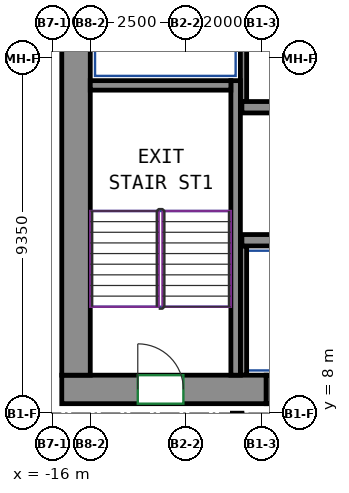
"""IFC4 building model, lengths in metres.
Left out: names, types, materials, properties, quantities, classifications, styles, units other than length and angle.
Written with IfcOpenShell. Run it as: python <this file> out.ifc"""

import sys

from ifc_helpers import new_model, si_unit, direction, frame, frame_2d, origin, place, context, subcontext, project, spatial, rectangle, extrude, source, transform, mapped, element, fill, save


model = new_model("IFC4")
c1 = context("Model", 3, precision=1e-05, world=origin(), true_north=direction((0.0, 1.0)))
c2 = subcontext(c1, "Body", "Model", "MODEL_VIEW")
j1 = project(units=[si_unit("LENGTHUNIT", "METRE"), si_unit("PLANEANGLEUNIT", "RADIAN")], contexts=[c1])
p1 = place(None, origin())
s1 = spatial("IfcSite", under=j1, at=p1, CompositionType="ELEMENT")
p2 = place(p1, origin())
s2 = spatial("IfcBuilding", under=s1, at=p2, CompositionType="ELEMENT")
p3 = place(p2, frame((0.0, 0.0, 182.1)))
s3 = spatial("IfcBuildingStorey", under=s2, at=p3, CompositionType="ELEMENT", Elevation=182.1)
m1 = source(origin(), c2, "Body", "SweptSolid", [
    extrude(rectangle(XDim=5.38, YDim=0.75, at=frame_2d((2.69, 0.0))), origin(), (0.0, 0.0, 1.0), 3.12),
])
p4 = place(p3, frame((-15.75, 8.625, 0.0), z_axis=(0.0, 0.0, 1.0), x_axis=(1.0, 0.0, 0.0)))
e1 = element("IfcWall", 1, at=p4, inside=s3, PredefinedType="SHEAR", context=c2, shape_type="MappedRepresentation", body=[
    mapped(m1, transform((0.0, 0.0, 0.0))),
])
p5 = place(p4, frame((2.0, 0.0, 0.0)))
e2 = element("IfcOpeningElement", 2, at=p5, cuts=e1, PredefinedType="OPENING", context=c2, shape_type="SweptSolid", body=[
    extrude(rectangle(XDim=1.2, YDim=2.1, at=frame_2d((0.6, 1.05))), frame((0.0, 0.385, 0.0), z_axis=(0.0, -1.0, 0.0), x_axis=(1.0, 0.0, 0.0)), (0.0, 0.0, 1.0), 0.77),
])
m2 = source(origin(), c2, "Body", "SweptSolid", [
    extrude(rectangle(XDim=12.0, YDim=0.75, at=frame_2d((6.0, 0.0))), origin(), (0.0, 0.0, 1.0), 3.12),
])
p6 = place(p3, frame((-15.375, 9.0, 0.0), z_axis=(0.0, 0.0, 1.0), x_axis=(0.0, 1.0, 0.0)))
e3 = element("IfcWall", 3, at=p6, inside=s3, PredefinedType="SHEAR", context=c2, shape_type="MappedRepresentation", body=[
    mapped(m2, transform((0.0, 0.0, 0.0))),
])
m3 = source(origin(), c2, "Body", "SweptSolid", [
    extrude(rectangle(XDim=7.75, YDim=0.25, at=frame_2d((3.875, 0.0))), origin(), (0.0, 0.0, 1.0), 3.12),
])
p7 = place(p3, frame((-11.175, 9.0, 0.0), z_axis=(0.0, 0.0, 1.0), x_axis=(0.0, 1.0, 0.0)))
e4 = element("IfcWall", 4, at=p7, inside=s3, PredefinedType="SHEAR", context=c2, shape_type="MappedRepresentation", body=[
    mapped(m3, transform((0.0, 0.0, 0.0))),
])
m4 = source(origin(), c2, "Body", "SweptSolid", [
    extrude(rectangle(XDim=3.7, YDim=0.25, at=frame_2d((1.85, 0.0))), origin(), (0.0, 0.0, 1.0), 3.12),
])
p8 = place(p3, frame((-15.0, 16.625, 0.0), z_axis=(0.0, 0.0, 1.0), x_axis=(1.0, 0.0, 0.0)))
e5 = element("IfcWall", 5, at=p8, inside=s3, PredefinedType="SHEAR", context=c2, shape_type="MappedRepresentation", body=[
    mapped(m4, transform((0.0, 0.0, 0.0))),
])
m5 = source(origin(), c2, "Body", "SweptSolid", [
    extrude(rectangle(XDim=6.0, YDim=0.3, at=frame_2d((3.0, 0.0))), origin(), (0.0, 0.0, 1.0), 3.12),
])
p9 = place(p3, frame((-11.01, 12.55, 0.0), z_axis=(0.0, 0.0, 1.0), x_axis=(1.0, 0.0, 0.0)))
e6 = element("IfcWall", 6, at=p9, inside=s3, PredefinedType="SHEAR", context=c2, shape_type="MappedRepresentation", body=[
    mapped(m5, transform((0.0, 0.0, 0.0))),
])
m6 = source(origin(), c2, "Body", "SweptSolid", [
    extrude(rectangle(XDim=14.04, YDim=0.3, at=frame_2d((7.02, 0.0))), origin(), (0.0, 0.0, 1.0), 3.12),
])
p10 = place(p3, frame((-11.01, 16.05, 0.0), z_axis=(0.0, 0.0, 1.0), x_axis=(1.0, 0.0, 0.0)))
e7 = element("IfcWall", 7, at=p10, inside=s3, PredefinedType="SHEAR", context=c2, shape_type="MappedRepresentation", body=[
    mapped(m6, transform((0.0, 0.0, 0.0))),
])
m7 = source(origin(), c2, "Body", "SweptSolid", [
    extrude(rectangle(XDim=4.8, YDim=0.165, at=frame_2d((2.4, 0.0))), origin(), (0.0, 0.0, 1.0), 3.12),
])
p11 = place(p3, frame((-10.968, 16.2, 0.0), z_axis=(0.0, 0.0, 1.0), x_axis=(0.0, 1.0, 0.0)))
e8 = element("IfcWall", 8, at=p11, inside=s3, PredefinedType="PARTITIONING", context=c2, shape_type="MappedRepresentation", body=[
    mapped(m7, transform((0.0, 0.0, 0.0))),
])
m8 = source(origin(), c2, "Body", "SweptSolid", [
    extrude(rectangle(XDim=3.4, YDim=0.165, at=frame_2d((1.7, 0.0))), origin(), (0.0, 0.0, 1.0), 3.12),
])
p12 = place(p3, frame((-10.968, 9.0, 0.0), z_axis=(0.0, 0.0, 1.0), x_axis=(0.0, 1.0, 0.0)))
e9 = element("IfcWall", 9, at=p12, inside=s3, PredefinedType="PARTITIONING", context=c2, shape_type="MappedRepresentation", body=[
    mapped(m8, transform((0.0, 0.0, 0.0))),
])
m9 = source(origin(), c2, "Body", "SweptSolid", [
    extrude(rectangle(XDim=1.4, YDim=0.75, at=frame_2d((0.7, 0.0))), origin(), (0.0, 0.0, 1.0), 2.7),
])
p13 = place(p3, frame((-10.37, 8.625, 0.0), z_axis=(0.0, 0.0, 1.0), x_axis=(1.0, 0.0, 0.0)))
e10 = element("IfcWall", 10, at=p13, inside=s3, PredefinedType="PARTITIONING", context=c2, shape_type="MappedRepresentation", body=[
    mapped(m9, transform((0.0, 0.0, 0.0))),
])
p14 = place(p13, frame((0.25, 0.0, 0.0)))
e11 = element("IfcOpeningElement", 11, at=p14, cuts=e10, PredefinedType="OPENING", context=c2, shape_type="SweptSolid", body=[
    extrude(rectangle(XDim=0.9, YDim=2.1, at=frame_2d((0.45, 1.05))), frame((0.0, 0.385, 0.0), z_axis=(0.0, -1.0, 0.0), x_axis=(1.0, 0.0, 0.0)), (0.0, 0.0, 1.0), 0.77),
])
p15 = place(p5, origin())
e12 = element("IfcDoor", 12, at=p15, inside=s3, OperationType="DOUBLE_DOOR_SINGLE_SWING", PredefinedType="DOOR", context=c2, shape_type="SweptSolid", body=[
    extrude(rectangle(XDim=1.2, YDim=2.1, at=frame_2d((0.6, 1.05))), frame((0.0, 0.28, 0.0), z_axis=(0.0, -1.0, 0.0), x_axis=(1.0, 0.0, 0.0)), (0.0, 0.0, 1.0), 0.05),
])
fill(e2, e12)
save(model, sys.argv[1])
